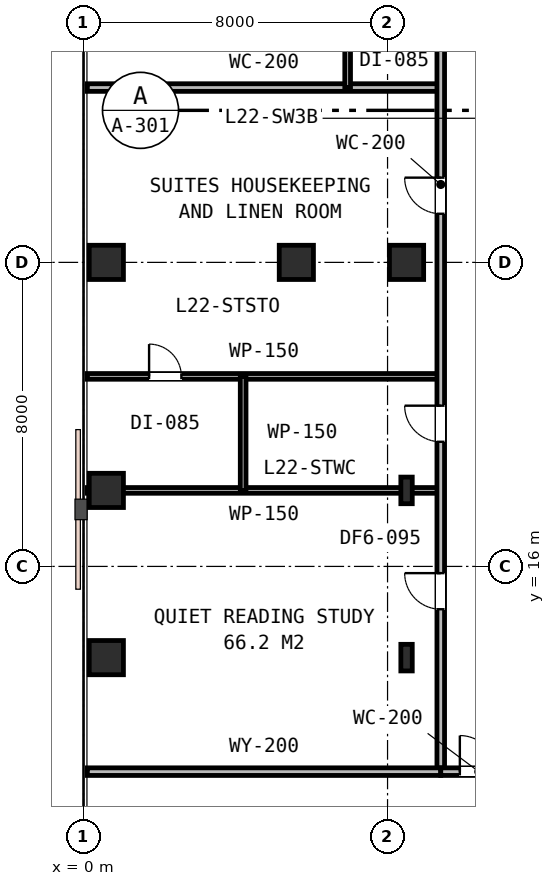
"""IFC4 building model, lengths in metres.
Left out: names, types, materials, properties, quantities, classifications, styles, units other than length and angle.
Written with IfcOpenShell. Run it as: python <this file> out.ifc"""

import sys

from ifc_helpers import new_model, si_unit, direction, frame, frame_2d, origin, origin_2d, place, context, subcontext, project, spatial, rectangle, i_section, extrude, element, fill, save


model = new_model("IFC4")
c1 = context("Model", 3, precision=1e-05, world=origin(), true_north=direction((0.0, 1.0)))
c2 = subcontext(c1, "Body", "Model", "MODEL_VIEW")
j1 = project(units=[si_unit("LENGTHUNIT", "METRE"), si_unit("PLANEANGLEUNIT", "RADIAN")], contexts=[c1])
p1 = place(None, origin())
s1 = spatial("IfcSite", under=j1, at=p1, CompositionType="ELEMENT")
p2 = place(p1, origin())
s2 = spatial("IfcBuilding", under=s1, at=p2, CompositionType="ELEMENT")
p3 = place(p2, frame((0.0, 0.0, 90.0)))
s3 = spatial("IfcBuildingStorey", under=s2, at=p3, CompositionType="ELEMENT", Elevation=90.0)
for number, where, z_axis, x_axis in (
    (1, (8.5, 24.0, 0.0), (0.0, 0.0, 1.0), (1.0, 0.0, 0.0)),
    (2, (5.6, 24.0, 0.0), (0.0, 0.0, 1.0), (1.0, 0.0, 0.0)),
    (3, (0.6, 24.0, 0.0), (0.0, 0.0, 1.0), (1.0, 0.0, 0.0)),
    (4, (0.6, 13.6, 0.0), (0.0, 0.0, 1.0), (1.0, 0.0, 0.0)),
    (5, (0.6, 18.0, 0.0), (0.0, 0.0, 1.0), (1.0, 0.0, 0.0)),
):
    element("IfcColumn", number, at=place(p3, frame(where, z_axis=z_axis, x_axis=x_axis)), inside=s3, PredefinedType="COLUMN", context=c2, shape_type="SweptSolid", body=[
        extrude(rectangle(XDim=0.9, YDim=0.9, at=origin_2d()), origin(), (0.0, 0.0, 1.0), 3.6),
    ])
for number, where, z_axis, x_axis in (
    (6, (8.5, 13.6, 0.0), (0.0, 0.0, 1.0), (1.0, 0.0, 0.0)),
    (7, (8.5, 18.0, 0.0), (0.0, 0.0, 1.0), (1.0, 0.0, 0.0)),
):
    element("IfcColumn", number, at=place(p3, frame(where, z_axis=z_axis, x_axis=x_axis)), inside=s3, PredefinedType="COLUMN", context=c2, shape_type="SweptSolid", body=[
        extrude(i_section(OverallWidth=0.3, OverallDepth=0.7, WebThickness=0.017, FlangeThickness=0.032, FilletRadius=0.027, at=origin_2d()), origin(), (0.0, 0.0, 1.0), 3.6),
    ])
p4 = place(p3, frame((0.1, 28.6, 0.0), z_axis=(0.0, 0.0, 1.0), x_axis=(1.0, 0.0, 0.0)))
e8 = element("IfcWall", 8, at=p4, inside=s3, PredefinedType="PARTITIONING", context=c2, shape_type="SweptSolid", body=[
    extrude(rectangle(XDim=9.3, YDim=0.2, at=frame_2d((4.65, 0.0))), origin(), (0.0, 0.0, 1.0), 2.83),
])
p5 = place(p3, frame((0.1, 18.0, 0.0), z_axis=(0.0, 0.0, 1.0), x_axis=(1.0, 0.0, 0.0)))
e9 = element("IfcWall", 9, at=p5, inside=s3, PredefinedType="PARTITIONING", context=c2, shape_type="SweptSolid", body=[
    extrude(rectangle(XDim=9.3, YDim=0.15, at=frame_2d((4.65, 0.0))), origin(), (0.0, 0.0, 1.0), 2.83),
])
p6 = place(p3, frame((0.1, 21.0, 0.0), z_axis=(0.0, 0.0, 1.0), x_axis=(1.0, 0.0, 0.0)))
e10 = element("IfcWall", 10, at=p6, inside=s3, PredefinedType="PARTITIONING", context=c2, shape_type="SweptSolid", body=[
    extrude(rectangle(XDim=9.3, YDim=0.15, at=frame_2d((4.65, 0.0))), origin(), (0.0, 0.0, 1.0), 2.83),
])
p7 = place(p6, frame((1.625, 0.0, 0.0)))
e11 = element("IfcOpeningElement", 11, at=p7, cuts=e10, PredefinedType="OPENING", context=c2, shape_type="SweptSolid", body=[
    extrude(rectangle(XDim=0.85, YDim=2.15, at=frame_2d((0.425, 1.075))), frame((0.0, 0.085, 0.0), z_axis=(0.0, -1.0, 0.0), x_axis=(1.0, 0.0, 0.0)), (0.0, 0.0, 1.0), 0.17),
])
p8 = place(p3, frame((4.2, 18.0, 0.0), z_axis=(0.0, 0.0, 1.0), x_axis=(0.0, 1.0, 0.0)))
e12 = element("IfcWall", 12, at=p8, inside=s3, PredefinedType="PARTITIONING", context=c2, shape_type="SweptSolid", body=[
    extrude(rectangle(XDim=3.0, YDim=0.15, at=frame_2d((1.5, 0.0))), origin(), (0.0, 0.0, 1.0), 2.83),
])
p9 = place(p3, frame((9.4, 10.6, 0.0), z_axis=(0.0, 0.0, 1.0), x_axis=(0.0, 1.0, 0.0)))
e13 = element("IfcWall", 13, at=p9, inside=s3, PredefinedType="PARTITIONING", context=c2, shape_type="SweptSolid", body=[
    extrude(rectangle(XDim=30.9, YDim=0.2, at=frame_2d((15.45, 0.0))), origin(), (0.0, 0.0, 1.0), 2.83),
])
p10 = place(p9, frame((8.679, 0.0, 0.0)))
e14 = element("IfcOpeningElement", 14, at=p10, cuts=e13, PredefinedType="OPENING", context=c2, shape_type="SweptSolid", body=[
    extrude(rectangle(XDim=0.95, YDim=2.15, at=frame_2d((0.475, 1.075))), frame((0.0, 0.11, 0.0), z_axis=(0.0, -1.0, 0.0), x_axis=(1.0, 0.0, 0.0)), (0.0, 0.0, 1.0), 0.22),
])
p11 = place(p9, frame((14.68, 0.0, 0.0)))
e15 = element("IfcOpeningElement", 15, at=p11, cuts=e13, PredefinedType="OPENING", context=c2, shape_type="SweptSolid", body=[
    extrude(rectangle(XDim=0.95, YDim=2.15, at=frame_2d((0.475, 1.075))), frame((0.0, 0.11, 0.0), z_axis=(0.0, -1.0, 0.0), x_axis=(1.0, 0.0, 0.0)), (0.0, 0.0, 1.0), 0.22),
])
p12 = place(p9, frame((4.273, 0.0, 0.0)))
e16 = element("IfcOpeningElement", 16, at=p12, cuts=e13, PredefinedType="OPENING", context=c2, shape_type="SweptSolid", body=[
    extrude(rectangle(XDim=0.95, YDim=2.15, at=frame_2d((0.475, 1.075))), frame((0.0, 0.11, 0.0), z_axis=(0.0, -1.0, 0.0), x_axis=(1.0, 0.0, 0.0)), (0.0, 0.0, 1.0), 0.22),
])
p13 = place(p9, frame((25.745, 0.0, 0.0)))
e17 = element("IfcOpeningElement", 17, at=p13, cuts=e13, PredefinedType="OPENING", context=c2, shape_type="SweptSolid", body=[
    extrude(rectangle(XDim=0.95, YDim=2.15, at=frame_2d((0.475, 1.075))), frame((0.0, 0.11, 0.0), z_axis=(0.0, -1.0, 0.0), x_axis=(1.0, 0.0, 0.0)), (0.0, 0.0, 1.0), 0.22),
])
p14 = place(p3, frame((6.95, 28.6, 0.0), z_axis=(0.0, 0.0, 1.0), x_axis=(0.0, 1.0, 0.0)))
e18 = element("IfcWall", 18, at=p14, inside=s3, PredefinedType="PARTITIONING", context=c2, shape_type="SweptSolid", body=[
    extrude(rectangle(XDim=4.25, YDim=0.15, at=frame_2d((2.125, 0.0))), origin(), (0.0, 0.0, 1.0), 2.83),
])
p15 = place(p3, frame((0.1, 10.6, 0.0), z_axis=(0.0, 0.0, 1.0), x_axis=(1.0, 0.0, 0.0)))
e19 = element("IfcWall", 19, at=p15, inside=s3, PredefinedType="PARTITIONING", context=c2, shape_type="SweptSolid", body=[
    extrude(rectangle(XDim=9.3, YDim=0.2, at=frame_2d((4.65, 0.0))), origin(), (0.0, 0.0, 1.0), 2.83),
])
p16 = place(p3, frame((9.4, 10.6, 0.0), z_axis=(0.0, 0.0, 1.0), x_axis=(1.0, 0.0, 0.0)))
e20 = element("IfcWall", 20, at=p16, inside=s3, PredefinedType="PARTITIONING", context=c2, shape_type="SweptSolid", body=[
    extrude(rectangle(XDim=2.0, YDim=0.2, at=frame_2d((1.0, 0.0))), origin(), (0.0, 0.0, 1.0), 3.02),
])
p17 = place(p16, frame((0.502, 0.0, 0.0)))
e21 = element("IfcOpeningElement", 21, at=p17, cuts=e20, PredefinedType="OPENING", context=c2, shape_type="SweptSolid", body=[
    extrude(rectangle(XDim=0.95, YDim=2.15, at=frame_2d((0.475, 1.075))), frame((0.0, 0.11, 0.0), z_axis=(0.0, -1.0, 0.0), x_axis=(1.0, 0.0, 0.0)), (0.0, 0.0, 1.0), 0.22),
])
p18 = place(p10, origin())
e22 = element("IfcDoor", 22, at=p18, inside=s3, OperationType="SINGLE_SWING_RIGHT", PredefinedType="DOOR", context=c2, shape_type="SweptSolid", body=[
    extrude(rectangle(XDim=0.95, YDim=2.15, at=frame_2d((0.475, 1.075))), frame((0.0, 0.025, 0.0), z_axis=(0.0, -1.0, 0.0), x_axis=(1.0, 0.0, 0.0)), (0.0, 0.0, 1.0), 0.05),
])
fill(e14, e22)
p19 = place(p7, origin())
e23 = element("IfcDoor", 23, at=p19, inside=s3, OperationType="SINGLE_SWING_LEFT", PredefinedType="DOOR", context=c2, shape_type="SweptSolid", body=[
    extrude(rectangle(XDim=0.85, YDim=2.15, at=frame_2d((0.425, 1.075))), frame((0.0, 0.025, 0.0), z_axis=(0.0, -1.0, 0.0), x_axis=(1.0, 0.0, 0.0)), (0.0, 0.0, 1.0), 0.05),
])
fill(e11, e23)
p20 = place(p11, origin())
e24 = element("IfcDoor", 24, at=p20, inside=s3, OperationType="SINGLE_SWING_RIGHT", PredefinedType="DOOR", context=c2, shape_type="SweptSolid", body=[
    extrude(rectangle(XDim=0.95, YDim=2.15, at=frame_2d((0.475, 1.075))), frame((0.0, 0.025, 0.0), z_axis=(0.0, -1.0, 0.0), x_axis=(1.0, 0.0, 0.0)), (0.0, 0.0, 1.0), 0.05),
])
fill(e15, e24)
p21 = place(p12, origin())
e25 = element("IfcDoor", 25, at=p21, inside=s3, OperationType="SINGLE_SWING_RIGHT", PredefinedType="DOOR", context=c2, shape_type="SweptSolid", body=[
    extrude(rectangle(XDim=0.95, YDim=2.15, at=frame_2d((0.475, 1.075))), frame((0.0, 0.025, 0.0), z_axis=(0.0, -1.0, 0.0), x_axis=(1.0, 0.0, 0.0)), (0.0, 0.0, 1.0), 0.05),
])
fill(e16, e25)
p22 = place(p17, origin())
e26 = element("IfcDoor", 26, at=p22, inside=s3, OperationType="SINGLE_SWING_LEFT", PredefinedType="DOOR", context=c2, shape_type="SweptSolid", body=[
    extrude(rectangle(XDim=0.95, YDim=2.15, at=frame_2d((0.475, 1.075))), frame((0.0, 0.025, 0.0), z_axis=(0.0, -1.0, 0.0), x_axis=(1.0, 0.0, 0.0)), (0.0, 0.0, 1.0), 0.05),
])
fill(e21, e26)
save(model, sys.argv[1])
